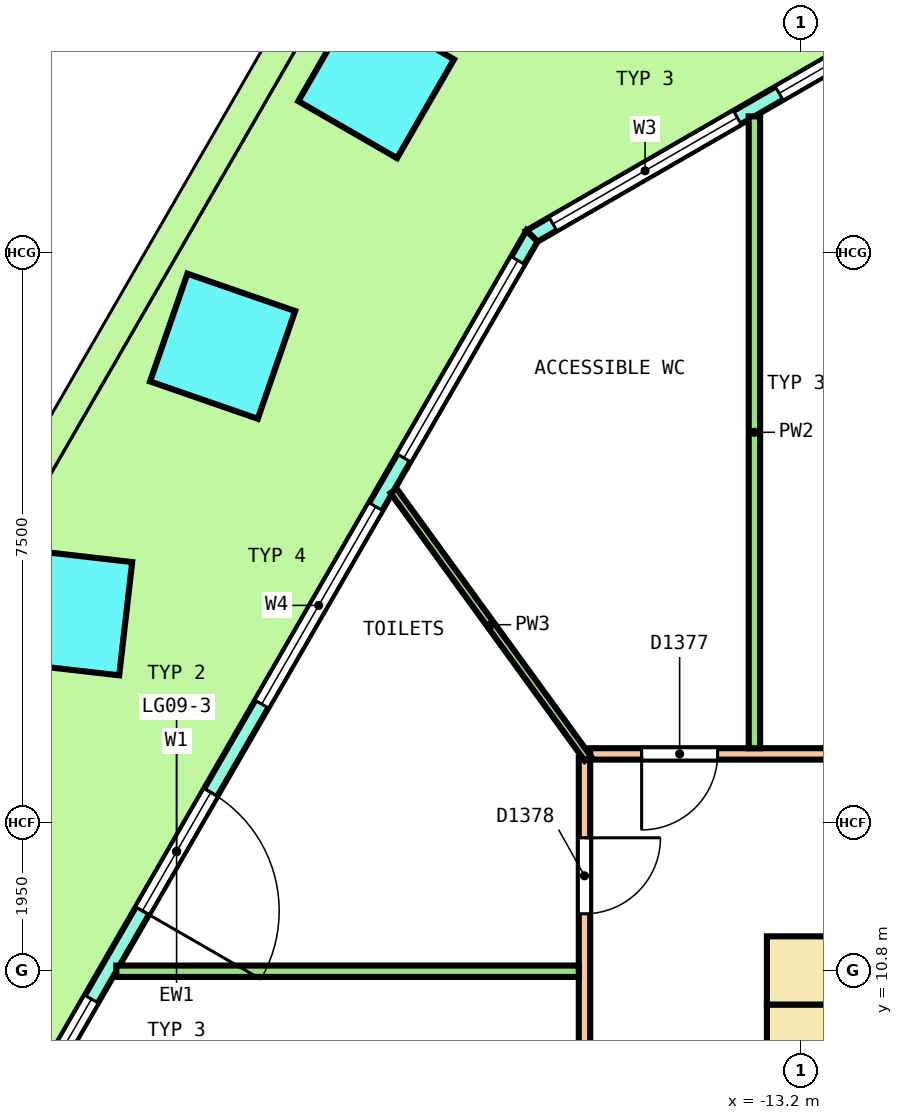
"""IFC4 building model, lengths in metres.
Left out: names, types, materials, properties, quantities, classifications, styles, units other than length and angle.
Written with IfcOpenShell. Run it as: python <this file> out.ifc"""

import sys

from ifc_helpers import new_model, si_unit, direction, frame, frame_2d, origin, origin_2d, place, context, subcontext, project, spatial, polyline, rectangle, outline, extrude, element, fill, save


model = new_model("IFC4")
c1 = context("Model", 3, precision=1e-05, world=origin(), true_north=direction((0.0, 1.0)))
c2 = subcontext(c1, "Body", "Model", "MODEL_VIEW")
j1 = project(units=[si_unit("LENGTHUNIT", "METRE"), si_unit("PLANEANGLEUNIT", "RADIAN")], contexts=[c1])
p1 = place(None, origin())
s1 = spatial("IfcSite", under=j1, at=p1, CompositionType="ELEMENT")
p2 = place(p1, origin())
s2 = spatial("IfcBuilding", under=s1, at=p2, CompositionType="ELEMENT")
p3 = place(p2, frame((0.0, 0.0, 41.0)))
s3 = spatial("IfcBuildingStorey", under=s2, at=p3, CompositionType="ELEMENT", Elevation=41.0)
p4 = place(p3, frame((-18.791, 22.512, 0.0), z_axis=(-0.036265236264, 0.0, 0.999342199969), x_axis=(-0.499424867419, -0.866167613071, -0.018123682572)))
e1 = element("IfcColumn", 1, at=p4, inside=s3, PredefinedType="COLUMN", context=c2, shape_type="SweptSolid", body=[
    extrude(rectangle(XDim=1.5, YDim=1.5, at=origin_2d()), origin(), (0.0, 0.0, 1.0), 4.053),
])
p5 = place(p3, frame((-20.811, 19.013, 0.0), z_axis=(-0.032654187208, 0.006265748099, 0.999447069363), x_axis=(-0.499519823947, -0.866234008258, -0.010889831076)))
e2 = element("IfcColumn", 2, at=p5, inside=s3, PredefinedType="COLUMN", context=c2, shape_type="SweptSolid", body=[
    extrude(rectangle(XDim=1.5, YDim=1.5, at=origin_2d()), origin(), (0.0, 0.0, 1.0), 4.052),
])
p6 = place(p3, frame((-22.831, 15.514, 0.0), z_axis=(-0.028980660531, 0.012532177527, 0.999501408624), x_axis=(-0.498879152216, -0.866664088686, -0.003598453299)))
e3 = element("IfcColumn", 3, at=p6, inside=s3, PredefinedType="COLUMN", context=c2, shape_type="SweptSolid", body=[
    extrude(rectangle(XDim=1.5, YDim=1.5, at=origin_2d()), origin(), (0.0, 0.0, 1.0), 4.052),
])
p7 = place(p3, frame((-10.788, 23.9, 0.0), z_axis=(0.0, 0.0, 1.0), x_axis=(-0.866029458321, -0.49999297727, 0.0)))
e4 = element("IfcWall", 4, at=p7, inside=s3, PredefinedType="SOLIDWALL", context=c2, shape_type="SweptSolid", body=[
    extrude(outline(polyline([(-0.027, -0.1), (1.128, -0.1), (2.282, -0.1), (3.437, -0.1), (4.592, -0.1), (5.747, -0.1), (6.901, -0.1), (6.848, 0.1), (5.711, 0.1), (4.574, 0.1), (3.437, 0.1), (2.301, 0.1), (1.164, 0.1), (0.027, 0.1), (-0.027, -0.1)])), origin(), (0.0, 0.0, 1.0), 4.1),
])
p8 = place(p7, frame((0.319, 0.0, 0.1)))
e5 = element("IfcOpeningElement", 5, at=p8, cuts=e4, PredefinedType="OPENING", context=c2, shape_type="SweptSolid", body=[
    extrude(rectangle(XDim=2.8, YDim=2.9, at=frame_2d((1.4, 1.45))), frame((0.0, 0.11, 0.0), z_axis=(0.0, -1.0, 0.0), x_axis=(1.0, 0.0, 0.0)), (0.0, 0.0, 1.0), 0.22),
])
p9 = place(p7, frame((3.756, 0.0, 0.1)))
e6 = element("IfcOpeningElement", 6, at=p9, cuts=e4, PredefinedType="OPENING", context=c2, shape_type="SweptSolid", body=[
    extrude(rectangle(XDim=2.8, YDim=2.9, at=frame_2d((1.4, 1.45))), frame((0.0, 0.11, 0.0), z_axis=(0.0, -1.0, 0.0), x_axis=(1.0, 0.0, 0.0)), (0.0, 0.0, 1.0), 0.22),
])
p10 = place(p3, frame((-16.741, 20.463, 0.0), z_axis=(0.0, 0.0, 1.0), x_axis=(-0.500003086107, -0.866023622012, 0.0)))
e7 = element("IfcWall", 7, at=p10, inside=s3, PredefinedType="SOLIDWALL", context=c2, shape_type="SweptSolid", body=[
    extrude(outline(polyline([(-0.027, -0.1), (1.015, -0.1), (2.057, -0.1), (3.099, -0.1), (4.141, -0.1), (5.183, -0.1), (6.225, -0.1), (7.267, -0.1), (8.309, -0.1), (9.351, -0.1), (10.393, -0.1), (11.435, -0.1), (12.476, -0.1), (13.518, -0.1), (14.56, -0.1), (15.602, -0.1), (16.644, -0.1), (17.686, -0.1), (18.728, -0.1), (18.674, 0.1), (17.638, 0.1), (16.602, 0.1), (15.566, 0.1), (14.531, 0.1), (13.494, 0.1), (12.458, 0.1), (11.423, 0.1), (10.386, 0.1), (9.351, 0.1), (8.315, 0.1), (7.279, 0.1), (6.243, 0.1), (5.207, 0.1), (4.171, 0.1), (3.135, 0.1), (2.099, 0.1), (1.063, 0.1), (0.027, 0.1), (-0.027, -0.1)])), origin(), (0.0, 0.0, 1.0), 4.1),
])
p11 = place(p10, frame((0.37, 0.0, 0.1)))
e8 = element("IfcOpeningElement", 8, at=p11, cuts=e7, PredefinedType="OPENING", context=c2, shape_type="SweptSolid", body=[
    extrude(rectangle(XDim=3.0, YDim=2.9, at=frame_2d((1.5, 1.45))), frame((0.0, 0.11, 0.0), z_axis=(0.0, -1.0, 0.0), x_axis=(1.0, 0.0, 0.0)), (0.0, 0.0, 1.0), 0.22),
])
p12 = place(p10, frame((4.11, 0.0, 0.1)))
e9 = element("IfcOpeningElement", 9, at=p12, cuts=e7, PredefinedType="OPENING", context=c2, shape_type="SweptSolid", body=[
    extrude(rectangle(XDim=3.0, YDim=2.9, at=frame_2d((1.5, 1.45))), frame((0.0, 0.11, 0.0), z_axis=(0.0, -1.0, 0.0), x_axis=(1.0, 0.0, 0.0)), (0.0, 0.0, 1.0), 0.22),
])
p13 = place(p10, frame((8.451, 0.0, 0.0)))
e10 = element("IfcOpeningElement", 10, at=p13, cuts=e7, PredefinedType="OPENING", context=c2, shape_type="SweptSolid", body=[
    extrude(rectangle(XDim=1.8, YDim=2.4, at=frame_2d((0.9, 1.2))), frame((0.0, 0.11, 0.0), z_axis=(0.0, -1.0, 0.0), x_axis=(1.0, 0.0, 0.0)), (0.0, 0.0, 1.0), 0.22),
])
p14 = place(p10, frame((8.451, 0.0, 2.55)))
e11 = element("IfcOpeningElement", 11, at=p14, cuts=e7, PredefinedType="OPENING", context=c2, shape_type="SweptSolid", body=[
    extrude(rectangle(XDim=1.8, YDim=0.45, at=frame_2d((0.9, 0.225))), frame((0.0, 0.11, 0.0), z_axis=(0.0, -1.0, 0.0), x_axis=(1.0, 0.0, 0.0)), (0.0, 0.0, 1.0), 0.22),
])
p15 = place(p10, frame((11.591, 0.0, 0.1)))
e12 = element("IfcOpeningElement", 12, at=p15, cuts=e7, PredefinedType="OPENING", context=c2, shape_type="SweptSolid", body=[
    extrude(rectangle(XDim=3.0, YDim=2.9, at=frame_2d((1.5, 1.45))), frame((0.0, 0.11, 0.0), z_axis=(0.0, -1.0, 0.0), x_axis=(1.0, 0.0, 0.0)), (0.0, 0.0, 1.0), 0.22),
])
p16 = place(p10, frame((15.331, 0.0, 0.1)))
e13 = element("IfcOpeningElement", 13, at=p16, cuts=e7, PredefinedType="OPENING", context=c2, shape_type="SweptSolid", body=[
    extrude(rectangle(XDim=3.0, YDim=2.9, at=frame_2d((1.5, 1.45))), frame((0.0, 0.11, 0.0), z_axis=(0.0, -1.0, 0.0), x_axis=(1.0, 0.0, 0.0)), (0.0, 0.0, 1.0), 0.22),
])
p17 = place(p3, frame((-13.65, 10.8, 0.0), z_axis=(0.0, 0.0, 1.0), x_axis=(1.0, 0.0, 0.0)))
e14 = element("IfcWall", 14, at=p17, inside=s3, PredefinedType="SHEAR", context=c2, shape_type="SweptSolid", body=[
    extrude(rectangle(XDim=27.3, YDim=0.9, at=frame_2d((13.65, 0.0))), origin(), (0.0, 0.0, 1.0), 4.1),
])
p18 = place(p17, frame((2.4, 0.0, 0.0)))
e15 = element("IfcOpeningElement", 15, at=p18, cuts=e14, PredefinedType="OPENING", context=c2, shape_type="SweptSolid", body=[
    extrude(rectangle(XDim=1.0, YDim=2.1, at=frame_2d((0.5, 1.05))), frame((0.0, 0.46, 0.0), z_axis=(0.0, -1.0, 0.0), x_axis=(1.0, 0.0, 0.0)), (0.0, 0.0, 1.0), 0.92),
])
p19 = place(p17, frame((6.494, 0.0, 0.0)))
e16 = element("IfcOpeningElement", 16, at=p19, cuts=e14, PredefinedType="OPENING", context=c2, shape_type="SweptSolid", body=[
    extrude(rectangle(XDim=1.0, YDim=2.1, at=frame_2d((0.5, 1.05))), frame((0.0, 0.46, 0.0), z_axis=(0.0, -1.0, 0.0), x_axis=(1.0, 0.0, 0.0)), (0.0, 0.0, 1.0), 0.92),
])
p20 = place(p17, frame((10.556, 0.0, 0.0)))
e17 = element("IfcOpeningElement", 17, at=p20, cuts=e14, PredefinedType="OPENING", context=c2, shape_type="SweptSolid", body=[
    extrude(rectangle(XDim=1.0, YDim=2.1, at=frame_2d((0.5, 1.05))), frame((0.0, 0.46, 0.0), z_axis=(0.0, -1.0, 0.0), x_axis=(1.0, 0.0, 0.0)), (0.0, 0.0, 1.0), 0.92),
])
p21 = place(p17, frame((18.077, 0.0, 0.0)))
e18 = element("IfcOpeningElement", 18, at=p21, cuts=e14, PredefinedType="OPENING", context=c2, shape_type="SweptSolid", body=[
    extrude(rectangle(XDim=1.0, YDim=2.1, at=frame_2d((0.5, 1.05))), frame((0.0, 0.46, 0.0), z_axis=(0.0, -1.0, 0.0), x_axis=(1.0, 0.0, 0.0)), (0.0, 0.0, 1.0), 0.92),
])
p22 = place(p17, frame((21.206, 0.0, 0.0)))
e19 = element("IfcOpeningElement", 19, at=p22, cuts=e14, PredefinedType="OPENING", context=c2, shape_type="SweptSolid", body=[
    extrude(rectangle(XDim=1.0, YDim=2.1, at=frame_2d((0.5, 1.05))), frame((0.0, 0.46, 0.0), z_axis=(0.0, -1.0, 0.0), x_axis=(1.0, 0.0, 0.0)), (0.0, 0.0, 1.0), 0.92),
])
p23 = place(p17, frame((24.367, 0.0, 0.0)))
e20 = element("IfcOpeningElement", 20, at=p23, cuts=e14, PredefinedType="OPENING", context=c2, shape_type="SweptSolid", body=[
    extrude(rectangle(XDim=1.0, YDim=2.1, at=frame_2d((0.5, 1.05))), frame((0.0, 0.46, 0.0), z_axis=(0.0, -1.0, 0.0), x_axis=(1.0, 0.0, 0.0)), (0.0, 0.0, 1.0), 0.92),
])
p24 = place(p17, frame((14.575, 0.0, 0.0)))
e21 = element("IfcOpeningElement", 21, at=p24, cuts=e14, PredefinedType="OPENING", context=c2, shape_type="SweptSolid", body=[
    extrude(rectangle(XDim=1.4, YDim=2.1, at=frame_2d((0.7, 1.05))), frame((0.0, 0.46, 0.0), z_axis=(0.0, -1.0, 0.0), x_axis=(1.0, 0.0, 0.0)), (0.0, 0.0, 1.0), 0.92),
])
p25 = place(p3, frame((-13.2, -10.35, 0.0), z_axis=(0.0, 0.0, 1.0), x_axis=(0.0, 1.0, 0.0)))
e22 = element("IfcWall", 22, at=p25, inside=s3, PredefinedType="SHEAR", context=c2, shape_type="SweptSolid", body=[
    extrude(rectangle(XDim=20.7, YDim=0.9, at=frame_2d((10.35, 0.0))), origin(), (0.0, 0.0, 1.0), 4.1),
])
p26 = place(p25, frame((9.15, 0.0, 0.0)))
e23 = element("IfcOpeningElement", 23, at=p26, cuts=e22, PredefinedType="OPENING", context=c2, shape_type="SweptSolid", body=[
    extrude(rectangle(XDim=2.4, YDim=2.1, at=frame_2d((1.2, 1.05))), frame((0.0, 0.46, 0.0), z_axis=(0.0, -1.0, 0.0), x_axis=(1.0, 0.0, 0.0)), (0.0, 0.0, 1.0), 0.92),
])
p27 = place(p25, frame((16.05, 0.0, 0.0)))
e24 = element("IfcOpeningElement", 24, at=p27, cuts=e22, PredefinedType="OPENING", context=c2, shape_type="SweptSolid", body=[
    extrude(rectangle(XDim=1.2, YDim=2.1, at=frame_2d((0.6, 1.05))), frame((0.0, 0.46, 0.0), z_axis=(0.0, -1.0, 0.0), x_axis=(1.0, 0.0, 0.0)), (0.0, 0.0, 1.0), 0.92),
])
p28 = place(p25, frame((3.45, 0.0, 0.0)))
e25 = element("IfcOpeningElement", 25, at=p28, cuts=e22, PredefinedType="OPENING", context=c2, shape_type="SweptSolid", body=[
    extrude(rectangle(XDim=1.2, YDim=2.1, at=frame_2d((0.6, 1.05))), frame((0.0, 0.46, 0.0), z_axis=(0.0, -1.0, 0.0), x_axis=(1.0, 0.0, 0.0)), (0.0, 0.0, 1.0), 0.92),
])
p29 = place(p3, frame((-15.975, 13.65, 0.0), z_axis=(0.0, 0.0, 1.0), x_axis=(1.0, 0.0, 0.0)))
e26 = element("IfcWall", 26, at=p29, inside=s3, PredefinedType="PARTITIONING", context=c2, shape_type="SweptSolid", body=[
    extrude(rectangle(XDim=31.95, YDim=0.15, at=frame_2d((15.975, 0.0))), origin(), (0.0, 0.0, 1.0), 3.05),
])
p30 = place(p29, frame((29.308, 0.0, 0.0)))
e27 = element("IfcOpeningElement", 27, at=p30, cuts=e26, PredefinedType="OPENING", context=c2, shape_type="SweptSolid", body=[
    extrude(rectangle(XDim=1.2, YDim=2.1, at=frame_2d((0.6, 1.05))), frame((0.0, 0.085, 0.0), z_axis=(0.0, -1.0, 0.0), x_axis=(1.0, 0.0, 0.0)), (0.0, 0.0, 1.0), 0.17),
])
p31 = place(p29, frame((17.538, 0.0, 0.0)))
e28 = element("IfcOpeningElement", 28, at=p31, cuts=e26, PredefinedType="OPENING", context=c2, shape_type="SweptSolid", body=[
    extrude(rectangle(XDim=1.2, YDim=2.1, at=frame_2d((0.6, 1.05))), frame((0.0, 0.085, 0.0), z_axis=(0.0, -1.0, 0.0), x_axis=(1.0, 0.0, 0.0)), (0.0, 0.0, 1.0), 0.17),
])
p32 = place(p29, frame((3.867, 0.0, 0.0)))
e29 = element("IfcOpeningElement", 29, at=p32, cuts=e26, PredefinedType="OPENING", context=c2, shape_type="SweptSolid", body=[
    extrude(rectangle(XDim=1.2, YDim=2.1, at=frame_2d((0.6, 1.05))), frame((0.0, 0.085, 0.0), z_axis=(0.0, -1.0, 0.0), x_axis=(1.0, 0.0, 0.0)), (0.0, 0.0, 1.0), 0.17),
])
p33 = place(p29, frame((0.677, 0.0, 0.0)))
e30 = element("IfcOpeningElement", 30, at=p33, cuts=e26, PredefinedType="OPENING", context=c2, shape_type="SweptSolid", body=[
    extrude(rectangle(XDim=1.0, YDim=2.1, at=frame_2d((0.5, 1.05))), frame((0.0, 0.085, 0.0), z_axis=(0.0, -1.0, 0.0), x_axis=(1.0, 0.0, 0.0)), (0.0, 0.0, 1.0), 0.17),
])
p34 = place(p3, frame((-16.05, -13.575, 0.0), z_axis=(0.0, 0.0, 1.0), x_axis=(0.0, 1.0, 0.0)))
e31 = element("IfcWall", 31, at=p34, inside=s3, PredefinedType="PARTITIONING", context=c2, shape_type="SweptSolid", body=[
    extrude(rectangle(XDim=27.175, YDim=0.15, at=frame_2d((13.587, 0.0))), origin(), (0.0, 0.0, 1.0), 3.05),
])
p35 = place(p34, frame((25.121, 0.0, 0.0)))
e32 = element("IfcOpeningElement", 32, at=p35, cuts=e31, PredefinedType="OPENING", context=c2, shape_type="SweptSolid", body=[
    extrude(rectangle(XDim=1.0, YDim=2.1, at=frame_2d((0.5, 1.05))), frame((0.0, 0.085, 0.0), z_axis=(0.0, -1.0, 0.0), x_axis=(1.0, 0.0, 0.0)), (0.0, 0.0, 1.0), 0.17),
])
p36 = place(p34, frame((18.782, 0.0, 0.0)))
e33 = element("IfcOpeningElement", 33, at=p36, cuts=e31, PredefinedType="OPENING", context=c2, shape_type="SweptSolid", body=[
    extrude(rectangle(XDim=1.2, YDim=2.1, at=frame_2d((0.6, 1.05))), frame((0.0, 0.085, 0.0), z_axis=(0.0, -1.0, 0.0), x_axis=(1.0, 0.0, 0.0)), (0.0, 0.0, 1.0), 0.17),
])
p37 = place(p34, frame((6.33, 0.0, 0.0)))
e34 = element("IfcOpeningElement", 34, at=p37, cuts=e31, PredefinedType="OPENING", context=c2, shape_type="SweptSolid", body=[
    extrude(rectangle(XDim=1.0, YDim=2.1, at=frame_2d((0.5, 1.05))), frame((0.0, 0.085, 0.0), z_axis=(0.0, -1.0, 0.0), x_axis=(1.0, 0.0, 0.0)), (0.0, 0.0, 1.0), 0.17),
])
p38 = place(p3, frame((-13.814, 13.725, 0.0), z_axis=(0.0, 0.0, 1.0), x_axis=(0.0, 1.0, 0.0)))
e35 = element("IfcWall", 35, at=p38, inside=s3, PredefinedType="PARTITIONING", context=c2, shape_type="SweptSolid", body=[
    extrude(rectangle(XDim=8.312, YDim=0.15, at=frame_2d((4.156, 0.0))), origin(), (0.0, 0.0, 1.0), 3.05),
])
p39 = place(p3, frame((-22.21, 10.791, 0.0), z_axis=(0.0, 0.0, 1.0), x_axis=(1.0, 0.0, 0.0)))
e36 = element("IfcWall", 36, at=p39, inside=s3, PredefinedType="PARTITIONING", context=c2, shape_type="SweptSolid", body=[
    extrude(rectangle(XDim=6.085, YDim=0.15, at=frame_2d((3.042, 0.0))), origin(), (0.0, 0.0, 1.0), 3.05),
])
p40 = place(p3, frame((-18.561, 17.11, 0.0), z_axis=(0.0, 0.0, 1.0), x_axis=(0.587400624475, -0.809296303196, 0.0)))
e37 = element("IfcWall", 37, at=p40, inside=s3, PredefinedType="PARTITIONING", context=c2, shape_type="SweptSolid", body=[
    extrude(rectangle(XDim=4.35, YDim=0.1, at=frame_2d((2.175, 0.0))), origin(), (0.0, 0.0, 1.0), 3.05),
])
p41 = place(p8, origin())
e38 = element("IfcWindow", 38, at=p41, inside=s3, PartitioningType="SINGLE_PANEL", PredefinedType="WINDOW", context=c2, shape_type="SweptSolid", body=[
    extrude(rectangle(XDim=2.8, YDim=2.9, at=frame_2d((1.4, 1.45))), frame((0.0, 0.03, 0.0), z_axis=(0.0, -1.0, 0.0), x_axis=(1.0, 0.0, 0.0)), (0.0, 0.0, 1.0), 0.06),
])
fill(e5, e38)
p42 = place(p9, origin())
e39 = element("IfcWindow", 39, at=p42, inside=s3, PartitioningType="SINGLE_PANEL", PredefinedType="WINDOW", context=c2, shape_type="SweptSolid", body=[
    extrude(rectangle(XDim=2.8, YDim=2.9, at=frame_2d((1.4, 1.45))), frame((0.0, 0.03, 0.0), z_axis=(0.0, -1.0, 0.0), x_axis=(1.0, 0.0, 0.0)), (0.0, 0.0, 1.0), 0.06),
])
fill(e6, e39)
p43 = place(p11, origin())
e40 = element("IfcWindow", 40, at=p43, inside=s3, PartitioningType="SINGLE_PANEL", PredefinedType="WINDOW", context=c2, shape_type="SweptSolid", body=[
    extrude(rectangle(XDim=3.0, YDim=2.9, at=frame_2d((1.5, 1.45))), frame((0.0, 0.03, 0.0), z_axis=(0.0, -1.0, 0.0), x_axis=(1.0, 0.0, 0.0)), (0.0, 0.0, 1.0), 0.06),
])
fill(e8, e40)
p44 = place(p12, origin())
e41 = element("IfcWindow", 41, at=p44, inside=s3, PartitioningType="SINGLE_PANEL", PredefinedType="WINDOW", context=c2, shape_type="SweptSolid", body=[
    extrude(rectangle(XDim=3.0, YDim=2.9, at=frame_2d((1.5, 1.45))), frame((0.0, 0.03, 0.0), z_axis=(0.0, -1.0, 0.0), x_axis=(1.0, 0.0, 0.0)), (0.0, 0.0, 1.0), 0.06),
])
fill(e9, e41)
p45 = place(p13, origin())
e42 = element("IfcDoor", 42, at=p45, inside=s3, OperationType="DOUBLE_DOOR_SINGLE_SWING", PredefinedType="DOOR", context=c2, shape_type="SweptSolid", body=[
    extrude(rectangle(XDim=1.8, YDim=2.4, at=frame_2d((0.9, 1.2))), frame((0.0, 0.025, 0.0), z_axis=(0.0, -1.0, 0.0), x_axis=(1.0, 0.0, 0.0)), (0.0, 0.0, 1.0), 0.05),
])
fill(e10, e42)
p46 = place(p14, origin())
e43 = element("IfcWindow", 43, at=p46, inside=s3, PartitioningType="SINGLE_PANEL", PredefinedType="WINDOW", context=c2, shape_type="SweptSolid", body=[
    extrude(rectangle(XDim=1.8, YDim=0.45, at=frame_2d((0.9, 0.225))), frame((0.0, 0.03, 0.0), z_axis=(0.0, -1.0, 0.0), x_axis=(1.0, 0.0, 0.0)), (0.0, 0.0, 1.0), 0.06),
])
fill(e11, e43)
p47 = place(p15, origin())
e44 = element("IfcWindow", 44, at=p47, inside=s3, PartitioningType="SINGLE_PANEL", PredefinedType="WINDOW", context=c2, shape_type="SweptSolid", body=[
    extrude(rectangle(XDim=3.0, YDim=2.9, at=frame_2d((1.5, 1.45))), frame((0.0, 0.03, 0.0), z_axis=(0.0, -1.0, 0.0), x_axis=(1.0, 0.0, 0.0)), (0.0, 0.0, 1.0), 0.06),
])
fill(e12, e44)
p48 = place(p33, origin())
e45 = element("IfcDoor", 45, at=p48, inside=s3, OperationType="SINGLE_SWING_RIGHT", PredefinedType="DOOR", context=c2, shape_type="SweptSolid", body=[
    extrude(rectangle(XDim=1.0, YDim=2.1, at=frame_2d((0.5, 1.05))), frame((0.0, 0.025, 0.0), z_axis=(0.0, -1.0, 0.0), x_axis=(1.0, 0.0, 0.0)), (0.0, 0.0, 1.0), 0.05),
])
fill(e30, e45)
p49 = place(p35, origin())
e46 = element("IfcDoor", 46, at=p49, inside=s3, OperationType="SINGLE_SWING_LEFT", PredefinedType="DOOR", context=c2, shape_type="SweptSolid", body=[
    extrude(rectangle(XDim=1.0, YDim=2.1, at=frame_2d((0.5, 1.05))), frame((0.0, 0.025, 0.0), z_axis=(0.0, -1.0, 0.0), x_axis=(1.0, 0.0, 0.0)), (0.0, 0.0, 1.0), 0.05),
])
fill(e32, e46)
save(model, sys.argv[1])
